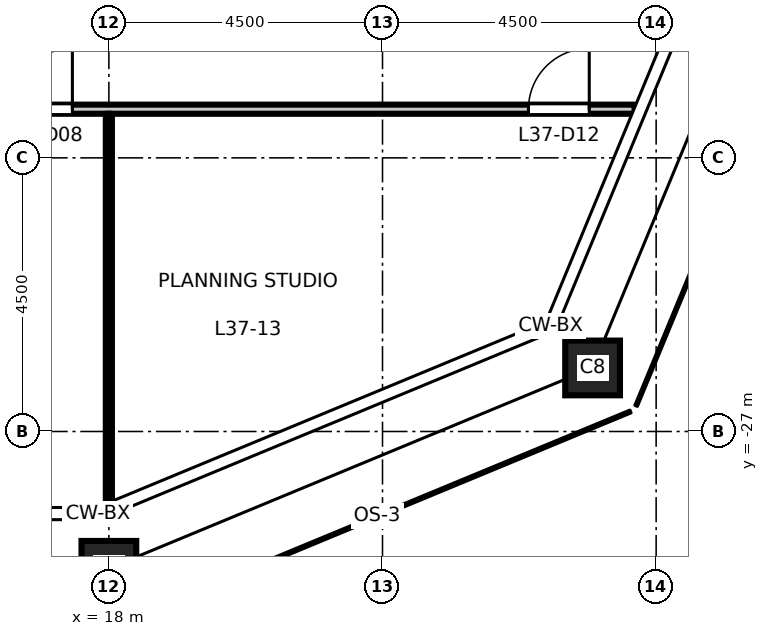
"""IFC4 building model, lengths in metres.
Left out: names, types, materials, properties, quantities, classifications, styles, units other than length and angle.
Written with IfcOpenShell. Run it as: python <this file> out.ifc"""

import sys

from ifc_helpers import new_model, si_unit, direction, frame, frame_2d, origin, origin_2d, place, context, subcontext, project, spatial, rectangle, hollow_rectangle, extrude, element, fill, save


model = new_model("IFC4")
c1 = context("Model", 3, precision=1e-05, world=origin(), true_north=direction((0.0, 1.0)))
c2 = subcontext(c1, "Body", "Model", "MODEL_VIEW")
j1 = project(units=[si_unit("LENGTHUNIT", "METRE"), si_unit("PLANEANGLEUNIT", "RADIAN")], contexts=[c1])
p1 = place(None, origin())
s1 = spatial("IfcSite", under=j1, at=p1, CompositionType="ELEMENT")
p2 = place(p1, origin())
s2 = spatial("IfcBuilding", under=s1, at=p2, CompositionType="ELEMENT")
p3 = place(p2, frame((0.0, 0.0, 172.2)))
s3 = spatial("IfcBuildingStorey", under=s2, at=p3, CompositionType="ELEMENT", Elevation=172.2)
for number, where, z_axis, x_axis in (
    (1, (18.0, -29.25, 0.0), (0.0, 0.0, 1.0), (1.0, 0.0, 0.0)),
    (2, (25.955, -25.955, 0.0), (0.0, 0.0, 1.0), (1.0, 0.0, 0.0)),
):
    element("IfcColumn", number, at=place(p3, frame(where, z_axis=z_axis, x_axis=x_axis)), inside=s3, PredefinedType="COLUMN", context=c2, shape_type="SweptSolid", body=[
        extrude(hollow_rectangle(XDim=0.9, YDim=0.9, WallThickness=0.05, at=origin_2d()), origin(), (0.0, 0.0, 1.0), 4.5),
    ])
p4 = place(p3, frame((-26.646, -21.7, 0.0), z_axis=(0.0, 0.0, 1.0), x_axis=(1.0, 0.0, 0.0)))
e3 = element("IfcWall", 3, at=p4, inside=s3, PredefinedType="PARTITIONING", context=c2, shape_type="SweptSolid", body=[
    extrude(rectangle(XDim=53.292, YDim=0.15, at=frame_2d((26.646, 0.0))), origin(), (0.0, 0.0, 1.0), 4.35),
])
p5 = place(p4, frame((9.296, 0.0, 0.0)))
e4 = element("IfcOpeningElement", 4, at=p5, cuts=e3, PredefinedType="OPENING", context=c2, shape_type="SweptSolid", body=[
    extrude(rectangle(XDim=1.0, YDim=2.1, at=frame_2d((0.5, 1.05))), frame((0.0, 0.085, 0.0), z_axis=(0.0, -1.0, 0.0), x_axis=(1.0, 0.0, 0.0)), (0.0, 0.0, 1.0), 0.17),
])
p6 = place(p4, frame((25.046, 0.0, 0.0)))
e5 = element("IfcOpeningElement", 5, at=p6, cuts=e3, PredefinedType="OPENING", context=c2, shape_type="SweptSolid", body=[
    extrude(rectangle(XDim=1.0, YDim=2.1, at=frame_2d((0.5, 1.05))), frame((0.0, 0.085, 0.0), z_axis=(0.0, -1.0, 0.0), x_axis=(1.0, 0.0, 0.0)), (0.0, 0.0, 1.0), 0.17),
])
p7 = place(p4, frame((27.296, 0.0, 0.0)))
e6 = element("IfcOpeningElement", 6, at=p7, cuts=e3, PredefinedType="OPENING", context=c2, shape_type="SweptSolid", body=[
    extrude(rectangle(XDim=1.0, YDim=2.1, at=frame_2d((0.5, 1.05))), frame((0.0, 0.085, 0.0), z_axis=(0.0, -1.0, 0.0), x_axis=(1.0, 0.0, 0.0)), (0.0, 0.0, 1.0), 0.17),
])
p8 = place(p4, frame((43.046, 0.0, 0.0)))
e7 = element("IfcOpeningElement", 7, at=p8, cuts=e3, PredefinedType="OPENING", context=c2, shape_type="SweptSolid", body=[
    extrude(rectangle(XDim=1.0, YDim=2.1, at=frame_2d((0.5, 1.05))), frame((0.0, 0.085, 0.0), z_axis=(0.0, -1.0, 0.0), x_axis=(1.0, 0.0, 0.0)), (0.0, 0.0, 1.0), 0.17),
])
p9 = place(p4, frame((0.65, 0.0, 0.0)))
e8 = element("IfcOpeningElement", 8, at=p9, cuts=e3, PredefinedType="OPENING", context=c2, shape_type="SweptSolid", body=[
    extrude(rectangle(XDim=1.0, YDim=2.1, at=frame_2d((0.5, 1.05))), frame((0.0, 0.085, 0.0), z_axis=(0.0, -1.0, 0.0), x_axis=(1.0, 0.0, 0.0)), (0.0, 0.0, 1.0), 0.17),
])
p10 = place(p4, frame((51.546, 0.0, 0.0)))
e9 = element("IfcOpeningElement", 9, at=p10, cuts=e3, PredefinedType="OPENING", context=c2, shape_type="SweptSolid", body=[
    extrude(rectangle(XDim=1.0, YDim=2.1, at=frame_2d((0.5, 1.05))), frame((0.0, 0.085, 0.0), z_axis=(0.0, -1.0, 0.0), x_axis=(1.0, 0.0, 0.0)), (0.0, 0.0, 1.0), 0.17),
])
p11 = place(p3, frame((18.0, -28.178, 0.0), z_axis=(0.0, 0.0, 1.0), x_axis=(0.0, 1.0, 0.0)))
e10 = element("IfcWall", 10, at=p11, inside=s3, PredefinedType="PARTITIONING", context=c2, shape_type="SweptSolid", body=[
    extrude(rectangle(XDim=6.403, YDim=0.1, at=frame_2d((3.202, 0.0))), origin(), (0.0, 0.0, 1.0), 3.45),
])
p12 = place(p8, origin())
e11 = element("IfcDoor", 11, at=p12, inside=s3, OperationType="SINGLE_SWING_RIGHT", PredefinedType="DOOR", context=c2, shape_type="SweptSolid", body=[
    extrude(rectangle(XDim=1.0, YDim=2.1, at=frame_2d((0.5, 1.05))), frame((0.0, 0.025, 0.0), z_axis=(0.0, -1.0, 0.0), x_axis=(1.0, 0.0, 0.0)), (0.0, 0.0, 1.0), 0.05),
])
fill(e7, e11)
p13 = place(p10, origin())
e12 = element("IfcDoor", 12, at=p13, inside=s3, OperationType="SINGLE_SWING_RIGHT", PredefinedType="DOOR", context=c2, shape_type="SweptSolid", body=[
    extrude(rectangle(XDim=1.0, YDim=2.1, at=frame_2d((0.5, 1.05))), frame((0.0, 0.025, 0.0), z_axis=(0.0, -1.0, 0.0), x_axis=(1.0, 0.0, 0.0)), (0.0, 0.0, 1.0), 0.05),
])
fill(e9, e12)
save(model, sys.argv[1])
